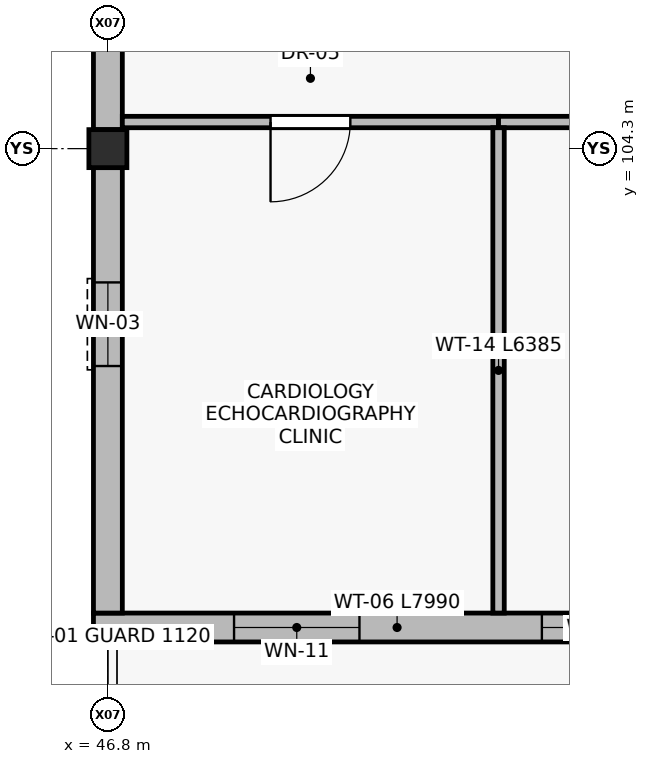
"""IFC4 building model, lengths in metres.
Left out: names, types, materials, properties, quantities, classifications, styles, units other than length and angle.
Written with IfcOpenShell. Run it as: python <this file> out.ifc"""

import sys

from ifc_helpers import new_model, si_unit, direction, frame, frame_2d, origin, origin_2d, place, context, subcontext, project, spatial, rectangle, extrude, element, fill, save


model = new_model("IFC4")
c1 = context("Model", 3, precision=1e-05, world=origin(), true_north=direction((0.0, 1.0)))
c2 = subcontext(c1, "Body", "Model", "MODEL_VIEW")
j1 = project(units=[si_unit("LENGTHUNIT", "METRE"), si_unit("PLANEANGLEUNIT", "RADIAN")], contexts=[c1])
p1 = place(None, origin())
s1 = spatial("IfcSite", under=j1, at=p1, CompositionType="ELEMENT")
p2 = place(p1, origin())
s2 = spatial("IfcBuilding", under=s1, at=p2, CompositionType="ELEMENT")
p3 = place(p2, frame((0.0, 0.0, 14.1)))
s3 = spatial("IfcBuildingStorey", under=s2, at=p3, CompositionType="ELEMENT", Elevation=14.1)
p4 = place(p3, frame((46.8, 104.3, 0.0), z_axis=(0.0, 0.0, 1.0), x_axis=(1.0, 0.0, 0.0)))
e1 = element("IfcColumn", 1, at=p4, inside=s3, PredefinedType="COLUMN", context=c2, shape_type="SweptSolid", body=[
    extrude(rectangle(XDim=0.5, YDim=0.5, at=origin_2d()), origin(), (0.0, 0.0, 1.0), 4.5),
])
p5 = place(p3, frame((54.6, 98.0, 0.0), z_axis=(0.0, 0.0, 1.0), x_axis=(-1.0, 0.0, 0.0)))
e2 = element("IfcWall", 2, at=p5, inside=s3, PredefinedType="STANDARD", context=c2, shape_type="SweptSolid", body=[
    extrude(rectangle(XDim=7.99, YDim=0.38, at=frame_2d((3.995, 0.0))), origin(), (0.0, 0.0, 1.0), 4.26),
])
p6 = place(p5, frame((0.59, 0.0, 0.9)))
e3 = element("IfcOpeningElement", 3, at=p6, cuts=e2, PredefinedType="OPENING", context=c2, shape_type="SweptSolid", body=[
    extrude(rectangle(XDim=1.5, YDim=2.2, at=frame_2d((0.75, 1.1))), frame((0.0, 0.2, 0.0), z_axis=(0.0, -1.0, 0.0), x_axis=(1.0, 0.0, 0.0)), (0.0, 0.0, 1.0), 0.4),
])
p7 = place(p5, frame((4.49, 0.0, 0.9)))
e4 = element("IfcOpeningElement", 4, at=p7, cuts=e2, PredefinedType="OPENING", context=c2, shape_type="SweptSolid", body=[
    extrude(rectangle(XDim=1.65, YDim=1.85, at=frame_2d((0.825, 0.925))), frame((0.0, 0.2, 0.0), z_axis=(0.0, -1.0, 0.0), x_axis=(1.0, 0.0, 0.0)), (0.0, 0.0, 1.0), 0.4),
])
p8 = place(p3, frame((46.8, 98.19, 0.0), z_axis=(0.0, 0.0, 1.0), x_axis=(0.0, 1.0, 0.0)))
e5 = element("IfcWall", 5, at=p8, inside=s3, PredefinedType="STANDARD", context=c2, shape_type="SweptSolid", body=[
    extrude(rectangle(XDim=5.86, YDim=0.38, at=frame_2d((2.93, 0.0))), origin(), (0.0, 0.0, 1.0), 3.82),
])
p9 = place(p8, frame((3.25, 0.0, 0.9)))
e6 = element("IfcOpeningElement", 6, at=p9, cuts=e5, PredefinedType="OPENING", context=c2, shape_type="SweptSolid", body=[
    extrude(rectangle(XDim=1.1, YDim=1.6, at=frame_2d((0.55, 0.8))), frame((0.0, 0.2, 0.0), z_axis=(0.0, -1.0, 0.0), x_axis=(1.0, 0.0, 0.0)), (0.0, 0.0, 1.0), 0.4),
])
p10 = place(p3, frame((46.8, 104.55, 0.0), z_axis=(0.0, 0.0, 1.0), x_axis=(0.0, 1.0, 0.0)))
e7 = element("IfcWall", 7, at=p10, inside=s3, PredefinedType="STANDARD", context=c2, shape_type="SweptSolid", body=[
    extrude(rectangle(XDim=3.4, YDim=0.38, at=frame_2d((1.7, 0.0))), origin(), (0.0, 0.0, 1.0), 3.82),
])
p11 = place(p10, frame((1.175, 0.0, 0.9)))
e8 = element("IfcOpeningElement", 8, at=p11, cuts=e7, PredefinedType="OPENING", context=c2, shape_type="SweptSolid", body=[
    extrude(rectangle(XDim=1.05, YDim=1.65, at=frame_2d((0.525, 0.825))), frame((0.0, 0.2, 0.0), z_axis=(0.0, -1.0, 0.0), x_axis=(1.0, 0.0, 0.0)), (0.0, 0.0, 1.0), 0.4),
])
p12 = place(p3, frame((51.94, 104.65, 0.0), z_axis=(0.0, 0.0, 1.0), x_axis=(-1.0, 0.0, 0.0)))
e9 = element("IfcWall", 9, at=p12, inside=s3, PredefinedType="PARTITIONING", context=c2, shape_type="SweptSolid", body=[
    extrude(rectangle(XDim=4.95, YDim=0.15, at=frame_2d((2.475, 0.0))), origin(), (0.0, 0.0, 1.0), 3.72),
])
p13 = place(p12, frame((1.95, 0.0, 0.0)))
e10 = element("IfcOpeningElement", 10, at=p13, cuts=e9, PredefinedType="OPENING", context=c2, shape_type="SweptSolid", body=[
    extrude(rectangle(XDim=1.05, YDim=2.15, at=frame_2d((0.525, 1.075))), frame((0.0, 0.085, 0.0), z_axis=(0.0, -1.0, 0.0), x_axis=(1.0, 0.0, 0.0)), (0.0, 0.0, 1.0), 0.17),
])
p14 = place(p3, frame((59.74, 104.65, 0.0), z_axis=(0.0, 0.0, 1.0), x_axis=(-1.0, 0.0, 0.0)))
e11 = element("IfcWall", 11, at=p14, inside=s3, PredefinedType="PARTITIONING", context=c2, shape_type="SweptSolid", body=[
    extrude(rectangle(XDim=7.8, YDim=0.15, at=frame_2d((3.9, 0.0))), origin(), (0.0, 0.0, 1.0), 3.72),
])
p15 = place(p14, frame((3.35, 0.0, 0.0)))
e12 = element("IfcOpeningElement", 12, at=p15, cuts=e11, PredefinedType="OPENING", context=c2, shape_type="SweptSolid", body=[
    extrude(rectangle(XDim=1.1, YDim=2.15, at=frame_2d((0.55, 1.075))), frame((0.0, 0.085, 0.0), z_axis=(0.0, -1.0, 0.0), x_axis=(1.0, 0.0, 0.0)), (0.0, 0.0, 1.0), 0.17),
])
p16 = place(p3, frame((51.94, 98.19, 0.0), z_axis=(0.0, 0.0, 1.0), x_axis=(0.0, 1.0, 0.0)))
e13 = element("IfcWall", 13, at=p16, inside=s3, PredefinedType="PARTITIONING", context=c2, shape_type="SweptSolid", body=[
    extrude(rectangle(XDim=6.385, YDim=0.15, at=frame_2d((3.192, 0.0))), origin(), (0.0, 0.0, 1.0), 3.95),
])
p17 = place(p6, origin())
e14 = element("IfcWindow", 14, at=p17, inside=s3, PartitioningType="SINGLE_PANEL", PredefinedType="WINDOW", context=c2, shape_type="SweptSolid", body=[
    extrude(rectangle(XDim=1.5, YDim=2.2, at=frame_2d((0.75, 1.1))), frame((0.0, 0.03, 0.0), z_axis=(0.0, -1.0, 0.0), x_axis=(1.0, 0.0, 0.0)), (0.0, 0.0, 1.0), 0.06),
])
fill(e3, e14)
p18 = place(p7, origin())
e15 = element("IfcWindow", 15, at=p18, inside=s3, PartitioningType="SINGLE_PANEL", PredefinedType="WINDOW", context=c2, shape_type="SweptSolid", body=[
    extrude(rectangle(XDim=1.65, YDim=1.85, at=frame_2d((0.825, 0.925))), frame((0.0, 0.03, 0.0), z_axis=(0.0, -1.0, 0.0), x_axis=(1.0, 0.0, 0.0)), (0.0, 0.0, 1.0), 0.06),
])
fill(e4, e15)
p19 = place(p9, origin())
e16 = element("IfcWindow", 16, at=p19, inside=s3, PartitioningType="SINGLE_PANEL", PredefinedType="WINDOW", context=c2, shape_type="SweptSolid", body=[
    extrude(rectangle(XDim=1.1, YDim=1.6, at=frame_2d((0.55, 0.8))), frame((0.0, 0.03, 0.0), z_axis=(0.0, -1.0, 0.0), x_axis=(1.0, 0.0, 0.0)), (0.0, 0.0, 1.0), 0.06),
])
fill(e6, e16)
p20 = place(p13, origin())
e17 = element("IfcDoor", 17, at=p20, inside=s3, OperationType="SINGLE_SWING_RIGHT", PredefinedType="DOOR", context=c2, shape_type="SweptSolid", body=[
    extrude(rectangle(XDim=1.05, YDim=2.15, at=frame_2d((0.525, 1.075))), frame((0.0, 0.025, 0.0), z_axis=(0.0, -1.0, 0.0), x_axis=(1.0, 0.0, 0.0)), (0.0, 0.0, 1.0), 0.05),
])
fill(e10, e17)
save(model, sys.argv[1])
